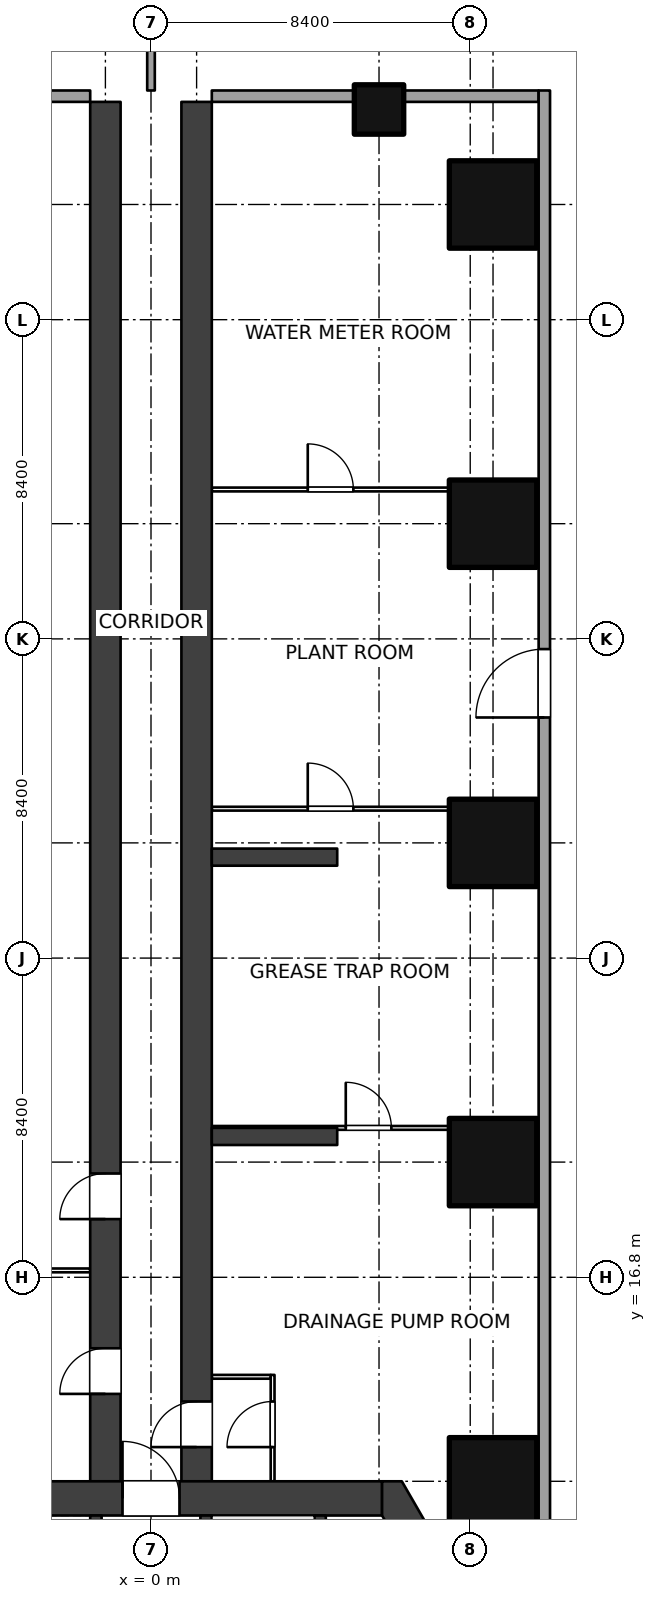
"""IFC4 building model, lengths in metres.
Left out: names, types, materials, properties, quantities, classifications, styles, units other than length and angle.
Written with IfcOpenShell. Run it as: python <this file> out.ifc"""

import sys

from ifc_helpers import new_model, si_unit, direction, frame, frame_2d, origin, origin_2d, place, context, subcontext, project, spatial, polyline, rectangle, outline, extrude, element, fill, save


model = new_model("IFC4")
c1 = context("Model", 3, precision=1e-05, world=origin(), true_north=direction((0.0, 1.0)))
c2 = subcontext(c1, "Body", "Model", "MODEL_VIEW")
j1 = project(units=[si_unit("LENGTHUNIT", "METRE"), si_unit("PLANEANGLEUNIT", "RADIAN")], contexts=[c1])
p1 = place(None, origin())
s1 = spatial("IfcSite", under=j1, at=p1, CompositionType="ELEMENT")
p2 = place(p1, origin())
s2 = spatial("IfcBuilding", under=s1, at=p2, CompositionType="ELEMENT")
p3 = place(p2, frame((0.0, 0.0, -7.0)))
s3 = spatial("IfcBuildingStorey", under=s2, at=p3, CompositionType="ELEMENT", Elevation=-7.0)
for number, where, z_axis, x_axis in (
    (1, (9.0, 11.432, 0.0), (0.0, 0.0, 1.0), (1.0, 0.0, 0.0)),
    (2, (9.0, 19.832, 0.0), (0.0, 0.0, 1.0), (1.0, 0.0, 0.0)),
    (3, (9.0, 28.231, 0.0), (0.0, 0.0, 1.0), (1.0, 0.0, 0.0)),
    (4, (9.0, 36.632, 0.0), (0.0, 0.0, 1.0), (1.0, 0.0, 0.0)),
    (5, (9.0, 45.031, 0.0), (0.0, 0.0, 1.0), (1.0, 0.0, 0.0)),
):
    element("IfcColumn", number, at=place(p3, frame(where, z_axis=z_axis, x_axis=x_axis)), inside=s3, PredefinedType="COLUMN", context=c2, shape_type="SweptSolid", body=[
        extrude(rectangle(XDim=2.3, YDim=2.3, at=origin_2d()), origin(), (0.0, 0.0, 1.0), 3.5),
    ])
p4 = place(p3, frame((6.0, 47.531, 0.0), z_axis=(0.0, 0.0, 1.0), x_axis=(1.0, 0.0, 0.0)))
e6 = element("IfcColumn", 6, at=p4, inside=s3, PredefinedType="COLUMN", context=c2, shape_type="SweptSolid", body=[
    extrude(rectangle(XDim=1.3, YDim=1.3, at=origin_2d()), origin(), (0.0, 0.0, 1.0), 3.5),
])
p5 = place(p3, frame((-6.08, 10.981, 0.0), z_axis=(0.0, 0.0, 1.0), x_axis=(1.0, 0.0, 0.0)))
e7 = element("IfcWall", 7, at=p5, inside=s3, PredefinedType="SHEAR", context=c2, shape_type="SweptSolid", body=[
    extrude(rectangle(XDim=12.161, YDim=0.9, at=frame_2d((6.08, 0.0))), origin(), (0.0, 0.0, 1.0), 3.5),
])
p6 = place(p5, frame((5.33, 0.0, 0.0)))
e8 = element("IfcOpeningElement", 8, at=p6, cuts=e7, PredefinedType="OPENING", context=c2, shape_type="SweptSolid", body=[
    extrude(rectangle(XDim=1.5, YDim=2.1, at=frame_2d((0.75, 1.05))), frame((0.0, 0.46, 0.0), z_axis=(0.0, -1.0, 0.0), x_axis=(1.0, 0.0, 0.0)), (0.0, 0.0, 1.0), 0.92),
])
p7 = place(p3, origin())
e9 = element("IfcWall", 9, at=p7, inside=s3, PredefinedType="SHEAR", context=c2, shape_type="SweptSolid", body=[
    extrude(outline(polyline([(13.2, 0.0), (6.6, 11.432), (6.08, 11.432), (6.08, 10.531), (12.161, 0.0), (12.94, -0.45), (13.2, 0.0)])), origin(), (0.0, 0.0, 1.0), 3.5),
])
p8 = place(p3, frame((1.45, 3.63, 0.0), z_axis=(0.0, 0.0, 1.0), x_axis=(0.0, 1.0, 0.0)))
e10 = element("IfcWall", 10, at=p8, inside=s3, PredefinedType="SHEAR", context=c2, shape_type="SweptSolid", body=[
    extrude(rectangle(XDim=6.902, YDim=0.3, at=frame_2d((3.451, 0.0))), origin(), (0.0, 0.0, 1.0), 3.5),
])
p9 = place(p8, frame((0.25, 0.0, 0.0)))
e11 = element("IfcOpeningElement", 11, at=p9, cuts=e10, PredefinedType="OPENING", context=c2, shape_type="SweptSolid", body=[
    extrude(rectangle(XDim=1.0, YDim=2.1, at=frame_2d((0.5, 1.05))), frame((0.0, 0.16, 0.0), z_axis=(0.0, -1.0, 0.0), x_axis=(1.0, 0.0, 0.0)), (0.0, 0.0, 1.0), 0.32),
])
p10 = place(p3, frame((4.45, 3.63, 0.0), z_axis=(0.0, 0.0, 1.0), x_axis=(0.0, 1.0, 0.0)))
e12 = element("IfcWall", 12, at=p10, inside=s3, PredefinedType="SHEAR", context=c2, shape_type="SweptSolid", body=[
    extrude(rectangle(XDim=6.902, YDim=0.3, at=frame_2d((3.451, 0.0))), origin(), (0.0, 0.0, 1.0), 3.5),
])
p11 = place(p3, frame((-1.45, 3.63, 0.0), z_axis=(0.0, 0.0, 1.0), x_axis=(0.0, 1.0, 0.0)))
e13 = element("IfcWall", 13, at=p11, inside=s3, PredefinedType="SHEAR", context=c2, shape_type="SweptSolid", body=[
    extrude(rectangle(XDim=6.902, YDim=0.3, at=frame_2d((3.451, 0.0))), origin(), (0.0, 0.0, 1.0), 3.5),
])
p12 = place(p11, frame((4.85, 0.0, 0.0)))
e14 = element("IfcOpeningElement", 14, at=p12, cuts=e13, PredefinedType="OPENING", context=c2, shape_type="SweptSolid", body=[
    extrude(rectangle(XDim=1.1, YDim=2.1, at=frame_2d((0.55, 1.05))), frame((0.0, 0.16, 0.0), z_axis=(0.0, -1.0, 0.0), x_axis=(1.0, 0.0, 0.0)), (0.0, 0.0, 1.0), 0.32),
])
p13 = place(p3, frame((-1.2, 10.981, 0.0), z_axis=(0.0, 0.0, 1.0), x_axis=(0.0, 1.0, 0.0)))
e15 = element("IfcWall", 15, at=p13, inside=s3, PredefinedType="SHEAR", context=c2, shape_type="SweptSolid", body=[
    extrude(rectangle(XDim=36.75, YDim=0.8, at=frame_2d((18.375, 0.0))), origin(), (0.0, 0.0, 1.0), 3.5),
])
p14 = place(p13, frame((2.75, 0.0, 0.0)))
e16 = element("IfcOpeningElement", 16, at=p14, cuts=e15, PredefinedType="OPENING", context=c2, shape_type="SweptSolid", body=[
    extrude(rectangle(XDim=1.2, YDim=2.1, at=frame_2d((0.6, 1.05))), frame((0.0, 0.41, 0.0), z_axis=(0.0, -1.0, 0.0), x_axis=(1.0, 0.0, 0.0)), (0.0, 0.0, 1.0), 0.82),
])
p15 = place(p13, frame((7.35, 0.0, 0.0)))
e17 = element("IfcOpeningElement", 17, at=p15, cuts=e15, PredefinedType="OPENING", context=c2, shape_type="SweptSolid", body=[
    extrude(rectangle(XDim=1.2, YDim=2.1, at=frame_2d((0.6, 1.05))), frame((0.0, 0.41, 0.0), z_axis=(0.0, -1.0, 0.0), x_axis=(1.0, 0.0, 0.0)), (0.0, 0.0, 1.0), 0.82),
])
p16 = place(p3, frame((1.2, 10.981, 0.0), z_axis=(0.0, 0.0, 1.0), x_axis=(0.0, 1.0, 0.0)))
e18 = element("IfcWall", 18, at=p16, inside=s3, PredefinedType="SHEAR", context=c2, shape_type="SweptSolid", body=[
    extrude(rectangle(XDim=36.75, YDim=0.8, at=frame_2d((18.375, 0.0))), origin(), (0.0, 0.0, 1.0), 3.5),
])
p17 = place(p16, frame((1.35, 0.0, 0.0)))
e19 = element("IfcOpeningElement", 19, at=p17, cuts=e18, PredefinedType="OPENING", context=c2, shape_type="SweptSolid", body=[
    extrude(rectangle(XDim=1.2, YDim=2.1, at=frame_2d((0.6, 1.05))), frame((0.0, 0.41, 0.0), z_axis=(0.0, -1.0, 0.0), x_axis=(1.0, 0.0, 0.0)), (0.0, 0.0, 1.0), 0.82),
])
p18 = place(p3, frame((-1.6, 16.981, 0.0), z_axis=(0.0, 0.0, 1.0), x_axis=(-1.0, 0.0, 0.0)))
e20 = element("IfcWall", 20, at=p18, inside=s3, PredefinedType="PARTITIONING", context=c2, shape_type="SweptSolid", body=[
    extrude(rectangle(XDim=3.15, YDim=0.1, at=frame_2d((1.575, 0.0))), origin(), (0.0, 0.0, 1.0), 3.2),
])
p19 = place(p3, frame((3.2, 11.432, 0.0), z_axis=(0.0, 0.0, 1.0), x_axis=(0.0, 1.0, 0.0)))
e21 = element("IfcWall", 21, at=p19, inside=s3, PredefinedType="PARTITIONING", context=c2, shape_type="SweptSolid", body=[
    extrude(rectangle(XDim=2.8, YDim=0.1, at=frame_2d((1.4, 0.0))), origin(), (0.0, 0.0, 1.0), 3.2),
])
p20 = place(p19, frame((0.9, 0.0, 0.0)))
e22 = element("IfcOpeningElement", 22, at=p20, cuts=e21, PredefinedType="OPENING", context=c2, shape_type="SweptSolid", body=[
    extrude(rectangle(XDim=1.2, YDim=2.1, at=frame_2d((0.6, 1.05))), frame((0.0, 0.06, 0.0), z_axis=(0.0, -1.0, 0.0), x_axis=(1.0, 0.0, 0.0)), (0.0, 0.0, 1.0), 0.12),
])
p21 = place(p3, frame((1.6, 14.182, 0.0), z_axis=(0.0, 0.0, 1.0), x_axis=(1.0, 0.0, 0.0)))
e23 = element("IfcWall", 23, at=p21, inside=s3, PredefinedType="PARTITIONING", context=c2, shape_type="SweptSolid", body=[
    extrude(rectangle(XDim=1.55, YDim=0.1, at=frame_2d((0.775, 0.0))), origin(), (0.0, 0.0, 1.0), 3.2),
])
p22 = place(p3, frame((1.6, 20.731, 0.0), z_axis=(0.0, 0.0, 1.0), x_axis=(1.0, 0.0, 0.0)))
e24 = element("IfcWall", 24, at=p22, inside=s3, PredefinedType="PARTITIONING", context=c2, shape_type="SweptSolid", body=[
    extrude(rectangle(XDim=8.6, YDim=0.1, at=frame_2d((4.3, 0.0))), origin(), (0.0, 0.0, 1.0), 3.2),
])
p23 = place(p22, frame((3.525, 0.0, 0.0)))
e25 = element("IfcOpeningElement", 25, at=p23, cuts=e24, PredefinedType="OPENING", context=c2, shape_type="SweptSolid", body=[
    extrude(rectangle(XDim=1.2, YDim=2.1, at=frame_2d((0.6, 1.05))), frame((0.0, 0.06, 0.0), z_axis=(0.0, -1.0, 0.0), x_axis=(1.0, 0.0, 0.0)), (0.0, 0.0, 1.0), 0.12),
])
p24 = place(p3, frame((1.6, 29.132, 0.0), z_axis=(0.0, 0.0, 1.0), x_axis=(1.0, 0.0, 0.0)))
e26 = element("IfcWall", 26, at=p24, inside=s3, PredefinedType="PARTITIONING", context=c2, shape_type="SweptSolid", body=[
    extrude(rectangle(XDim=8.6, YDim=0.1, at=frame_2d((4.3, 0.0))), origin(), (0.0, 0.0, 1.0), 3.2),
])
p25 = place(p24, frame((2.525, 0.0, 0.0)))
e27 = element("IfcOpeningElement", 27, at=p25, cuts=e26, PredefinedType="OPENING", context=c2, shape_type="SweptSolid", body=[
    extrude(rectangle(XDim=1.2, YDim=2.1, at=frame_2d((0.6, 1.05))), frame((0.0, 0.06, 0.0), z_axis=(0.0, -1.0, 0.0), x_axis=(1.0, 0.0, 0.0)), (0.0, 0.0, 1.0), 0.12),
])
p26 = place(p3, frame((1.6, 37.531, 0.0), z_axis=(0.0, 0.0, 1.0), x_axis=(1.0, 0.0, 0.0)))
e28 = element("IfcWall", 28, at=p26, inside=s3, PredefinedType="PARTITIONING", context=c2, shape_type="SweptSolid", body=[
    extrude(rectangle(XDim=8.6, YDim=0.1, at=frame_2d((4.3, 0.0))), origin(), (0.0, 0.0, 1.0), 3.2),
])
p27 = place(p26, frame((2.525, 0.0, 0.0)))
e29 = element("IfcOpeningElement", 29, at=p27, cuts=e28, PredefinedType="OPENING", context=c2, shape_type="SweptSolid", body=[
    extrude(rectangle(XDim=1.2, YDim=2.1, at=frame_2d((0.6, 1.05))), frame((0.0, 0.06, 0.0), z_axis=(0.0, -1.0, 0.0), x_axis=(1.0, 0.0, 0.0)), (0.0, 0.0, 1.0), 0.12),
])
p28 = place(p3, frame((0.0, 48.031, 0.0), z_axis=(0.0, 0.0, 1.0), x_axis=(0.0, 1.0, 0.0)))
e30 = element("IfcWall", 30, at=p28, inside=s3, PredefinedType="SOLIDWALL", context=c2, shape_type="SweptSolid", body=[
    extrude(rectangle(XDim=2.769, YDim=0.2, at=frame_2d((1.384, 0.0))), origin(), (0.0, 0.0, 1.0), 3.2),
])
for number, where, z_axis, x_axis in (
    (31, (-1.6, 47.882, 0.0), (0.0, 0.0, 1.0), (-1.0, 0.0, 0.0)),
    (32, (1.6, 47.882, 0.0), (0.0, 0.0, 1.0), (1.0, 0.0, 0.0)),
):
    element("IfcWall", number, at=place(p3, frame(where, z_axis=z_axis, x_axis=x_axis)), inside=s3, PredefinedType="SOLIDWALL", context=c2, shape_type="SweptSolid", body=[
        extrude(rectangle(XDim=8.6, YDim=0.3, at=frame_2d((4.3, 0.0))), origin(), (0.0, 0.0, 1.0), 1.9),
    ])
p29 = place(p3, frame((10.35, 6.149, 0.0), z_axis=(0.0, 0.0, 1.0), x_axis=(0.0, 1.0, 0.0)))
e33 = element("IfcWall", 33, at=p29, inside=s3, PredefinedType="SOLIDWALL", context=c2, shape_type="SweptSolid", body=[
    extrude(rectangle(XDim=41.883, YDim=0.3, at=frame_2d((20.941, 0.0))), origin(), (0.0, 0.0, 1.0), 3.2),
])
p30 = place(p29, frame((25.383, 0.0, 0.0)))
e34 = element("IfcOpeningElement", 34, at=p30, cuts=e33, PredefinedType="OPENING", context=c2, shape_type="SweptSolid", body=[
    extrude(rectangle(XDim=1.8, YDim=2.4, at=frame_2d((0.9, 1.2))), frame((0.0, 0.16, 0.0), z_axis=(0.0, -1.0, 0.0), x_axis=(1.0, 0.0, 0.0)), (0.0, 0.0, 1.0), 0.32),
])
for number, where, z_axis, x_axis in (
    (35, (1.6, 20.507, 0.0), (0.0, 0.0, 1.0), (1.0, 0.0, 0.0)),
    (36, (1.6, 27.856, 0.0), (0.0, 0.0, 1.0), (1.0, 0.0, 0.0)),
):
    element("IfcWall", number, at=place(p3, frame(where, z_axis=z_axis, x_axis=x_axis)), inside=s3, PredefinedType="SOLIDWALL", context=c2, shape_type="SweptSolid", body=[
        extrude(rectangle(XDim=3.3, YDim=0.45, at=frame_2d((1.65, 0.0))), origin(), (0.0, 0.0, 1.0), 3.5),
    ])
p31 = place(p6, origin())
e37 = element("IfcDoor", 37, at=p31, inside=s3, OperationType="DOUBLE_DOOR_DOUBLE_SWING", PredefinedType="DOOR", context=c2, shape_type="SweptSolid", body=[
    extrude(rectangle(XDim=1.5, YDim=2.1, at=frame_2d((0.75, 1.05))), frame((0.0, 0.025, 0.0), z_axis=(0.0, -1.0, 0.0), x_axis=(1.0, 0.0, 0.0)), (0.0, 0.0, 1.0), 0.05),
])
fill(e8, e37)
p32 = place(p14, origin())
e38 = element("IfcDoor", 38, at=p32, inside=s3, OperationType="DOUBLE_SWING_LEFT", PredefinedType="DOOR", context=c2, shape_type="SweptSolid", body=[
    extrude(rectangle(XDim=1.2, YDim=2.1, at=frame_2d((0.6, 1.05))), frame((0.0, 0.025, 0.0), z_axis=(0.0, -1.0, 0.0), x_axis=(1.0, 0.0, 0.0)), (0.0, 0.0, 1.0), 0.05),
])
fill(e16, e38)
p33 = place(p15, origin())
e39 = element("IfcDoor", 39, at=p33, inside=s3, OperationType="DOUBLE_SWING_LEFT", PredefinedType="DOOR", context=c2, shape_type="SweptSolid", body=[
    extrude(rectangle(XDim=1.2, YDim=2.1, at=frame_2d((0.6, 1.05))), frame((0.0, 0.025, 0.0), z_axis=(0.0, -1.0, 0.0), x_axis=(1.0, 0.0, 0.0)), (0.0, 0.0, 1.0), 0.05),
])
fill(e17, e39)
p34 = place(p17, origin())
e40 = element("IfcDoor", 40, at=p34, inside=s3, OperationType="DOUBLE_SWING_LEFT", PredefinedType="DOOR", context=c2, shape_type="SweptSolid", body=[
    extrude(rectangle(XDim=1.2, YDim=2.1, at=frame_2d((0.6, 1.05))), frame((0.0, 0.025, 0.0), z_axis=(0.0, -1.0, 0.0), x_axis=(1.0, 0.0, 0.0)), (0.0, 0.0, 1.0), 0.05),
])
fill(e19, e40)
p35 = place(p23, origin())
e41 = element("IfcDoor", 41, at=p35, inside=s3, OperationType="DOUBLE_SWING_LEFT", PredefinedType="DOOR", context=c2, shape_type="SweptSolid", body=[
    extrude(rectangle(XDim=1.2, YDim=2.1, at=frame_2d((0.6, 1.05))), frame((0.0, 0.025, 0.0), z_axis=(0.0, -1.0, 0.0), x_axis=(1.0, 0.0, 0.0)), (0.0, 0.0, 1.0), 0.05),
])
fill(e25, e41)
p36 = place(p25, origin())
e42 = element("IfcDoor", 42, at=p36, inside=s3, OperationType="DOUBLE_SWING_LEFT", PredefinedType="DOOR", context=c2, shape_type="SweptSolid", body=[
    extrude(rectangle(XDim=1.2, YDim=2.1, at=frame_2d((0.6, 1.05))), frame((0.0, 0.025, 0.0), z_axis=(0.0, -1.0, 0.0), x_axis=(1.0, 0.0, 0.0)), (0.0, 0.0, 1.0), 0.05),
])
fill(e27, e42)
p37 = place(p27, origin())
e43 = element("IfcDoor", 43, at=p37, inside=s3, OperationType="DOUBLE_SWING_LEFT", PredefinedType="DOOR", context=c2, shape_type="SweptSolid", body=[
    extrude(rectangle(XDim=1.2, YDim=2.1, at=frame_2d((0.6, 1.05))), frame((0.0, 0.025, 0.0), z_axis=(0.0, -1.0, 0.0), x_axis=(1.0, 0.0, 0.0)), (0.0, 0.0, 1.0), 0.05),
])
fill(e29, e43)
p38 = place(p20, origin())
e44 = element("IfcDoor", 44, at=p38, inside=s3, OperationType="DOUBLE_SWING_LEFT", PredefinedType="DOOR", context=c2, shape_type="SweptSolid", body=[
    extrude(rectangle(XDim=1.2, YDim=2.1, at=frame_2d((0.6, 1.05))), frame((0.0, 0.025, 0.0), z_axis=(0.0, -1.0, 0.0), x_axis=(1.0, 0.0, 0.0)), (0.0, 0.0, 1.0), 0.05),
])
fill(e22, e44)
p39 = place(p30, origin())
e45 = element("IfcDoor", 45, at=p39, inside=s3, OperationType="DOUBLE_DOOR_DOUBLE_SWING", PredefinedType="DOOR", context=c2, shape_type="SweptSolid", body=[
    extrude(rectangle(XDim=1.8, YDim=2.4, at=frame_2d((0.9, 1.2))), frame((0.0, 0.025, 0.0), z_axis=(0.0, -1.0, 0.0), x_axis=(1.0, 0.0, 0.0)), (0.0, 0.0, 1.0), 0.05),
])
fill(e34, e45)
save(model, sys.argv[1])
